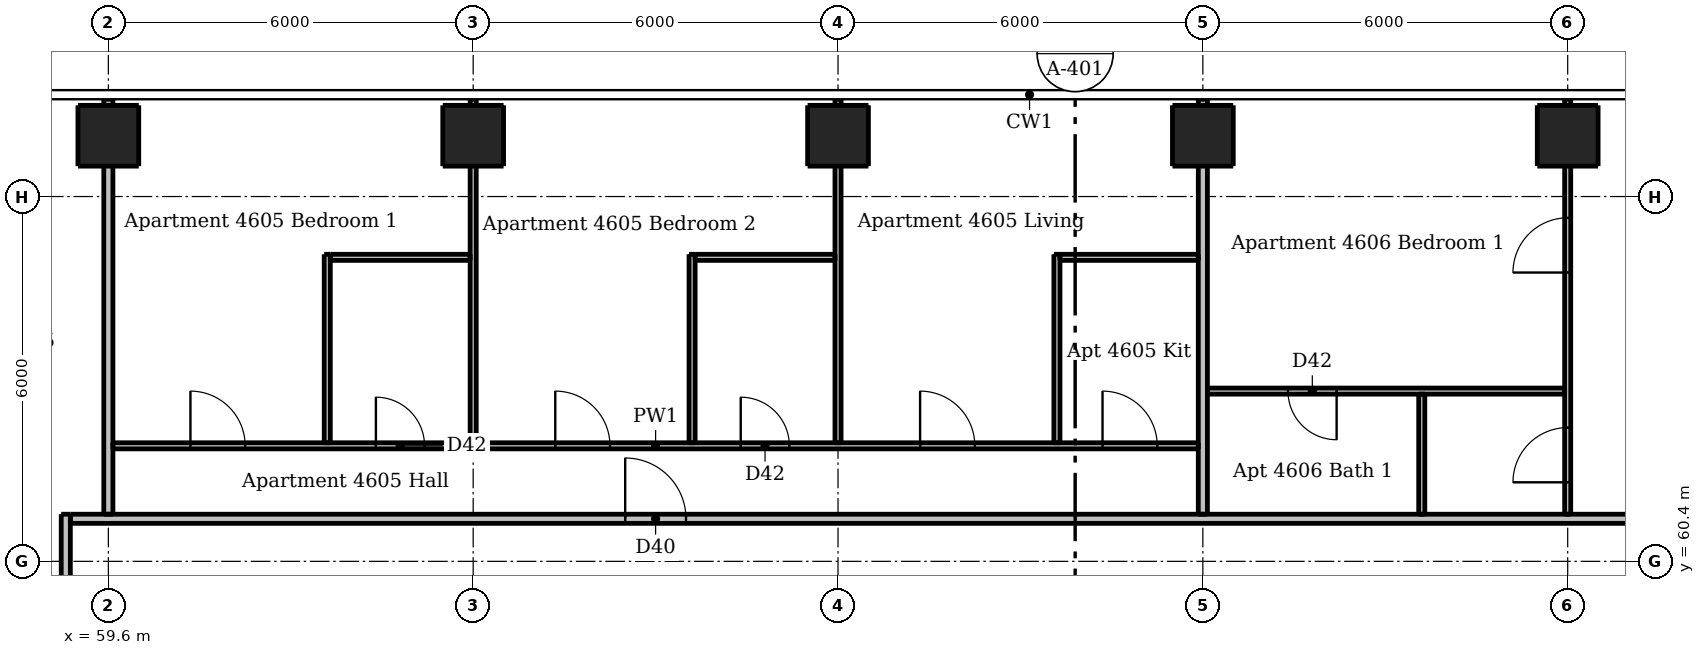
"""IFC4 building model, lengths in metres.
Left out: names, types, materials, properties, quantities, classifications, styles, units other than length and angle.
Written with IfcOpenShell. Run it as: python <this file> out.ifc"""

import sys

from ifc_helpers import new_model, si_unit, direction, frame, frame_2d, origin, origin_2d, place, context, subcontext, project, spatial, rectangle, extrude, element, fill, save


model = new_model("IFC4")
c1 = context("Model", 3, precision=1e-05, world=origin(), true_north=direction((0.0, 1.0)))
c2 = subcontext(c1, "Body", "Model", "MODEL_VIEW")
j1 = project(units=[si_unit("LENGTHUNIT", "METRE"), si_unit("PLANEANGLEUNIT", "RADIAN")], contexts=[c1])
p1 = place(None, origin())
s1 = spatial("IfcSite", under=j1, at=p1, CompositionType="ELEMENT")
p2 = place(p1, origin())
s2 = spatial("IfcBuilding", under=s1, at=p2, CompositionType="ELEMENT")
p3 = place(p2, frame((0.0, 0.0, 171.4)))
s3 = spatial("IfcBuildingStorey", under=s2, at=p3, CompositionType="ELEMENT", Elevation=171.4)
for number, where, z_axis, x_axis in (
    (1, (59.6, 67.4, 0.0), (0.0, 0.0, 1.0), (1.0, 0.0, 0.0)),
    (2, (65.6, 67.4, 0.0), (0.0, 0.0, 1.0), (1.0, 0.0, 0.0)),
    (3, (71.6, 67.4, 0.0), (0.0, 0.0, 1.0), (1.0, 0.0, 0.0)),
    (4, (77.6, 67.4, 0.0), (0.0, 0.0, 1.0), (1.0, 0.0, 0.0)),
    (5, (83.6, 67.4, 0.0), (0.0, 0.0, 1.0), (1.0, 0.0, 0.0)),
):
    element("IfcColumn", number, at=place(p3, frame(where, z_axis=z_axis, x_axis=x_axis)), inside=s3, PredefinedType="COLUMN", context=c2, shape_type="SweptSolid", body=[
        extrude(rectangle(XDim=1.0, YDim=1.0, at=origin_2d()), origin(), (0.0, 0.0, 1.0), 3.05),
    ])
p4 = place(p3, frame((63.2, 62.35, 0.0), z_axis=(0.0, 0.0, 1.0), x_axis=(0.0, 1.0, 0.0)))
e6 = element("IfcWall", 6, at=p4, inside=s3, PredefinedType="PARTITIONING", context=c2, shape_type="SweptSolid", body=[
    extrude(rectangle(XDim=3.1, YDim=0.1, at=frame_2d((1.55, 0.0))), origin(), (0.0, 0.0, 1.0), 3.05),
])
p5 = place(p3, frame((65.6, 62.35, 0.0), z_axis=(0.0, 0.0, 1.0), x_axis=(0.0, 1.0, 0.0)))
e7 = element("IfcWall", 7, at=p5, inside=s3, PredefinedType="PARTITIONING", context=c2, shape_type="SweptSolid", body=[
    extrude(rectangle(XDim=5.65, YDim=0.1, at=frame_2d((2.825, 0.0))), origin(), (0.0, 0.0, 1.0), 2.516),
])
p6 = place(p3, frame((69.2, 62.35, 0.0), z_axis=(0.0, 0.0, 1.0), x_axis=(0.0, 1.0, 0.0)))
e8 = element("IfcWall", 8, at=p6, inside=s3, PredefinedType="PARTITIONING", context=c2, shape_type="SweptSolid", body=[
    extrude(rectangle(XDim=3.1, YDim=0.1, at=frame_2d((1.55, 0.0))), origin(), (0.0, 0.0, 1.0), 3.05),
])
p7 = place(p3, frame((71.6, 62.35, 0.0), z_axis=(0.0, 0.0, 1.0), x_axis=(0.0, 1.0, 0.0)))
e9 = element("IfcWall", 9, at=p7, inside=s3, PredefinedType="PARTITIONING", context=c2, shape_type="SweptSolid", body=[
    extrude(rectangle(XDim=5.65, YDim=0.1, at=frame_2d((2.825, 0.0))), origin(), (0.0, 0.0, 1.0), 2.516),
])
p8 = place(p3, frame((75.2, 62.35, 0.0), z_axis=(0.0, 0.0, 1.0), x_axis=(0.0, 1.0, 0.0)))
e10 = element("IfcWall", 10, at=p8, inside=s3, PredefinedType="PARTITIONING", context=c2, shape_type="SweptSolid", body=[
    extrude(rectangle(XDim=3.1, YDim=0.1, at=frame_2d((1.55, 0.0))), origin(), (0.0, 0.0, 1.0), 3.05),
])
p9 = place(p3, frame((81.2, 61.175, 0.0), z_axis=(0.0, 0.0, 1.0), x_axis=(0.0, 1.0, 0.0)))
e11 = element("IfcWall", 11, at=p9, inside=s3, PredefinedType="PARTITIONING", context=c2, shape_type="SweptSolid", body=[
    extrude(rectangle(XDim=1.975, YDim=0.1, at=frame_2d((0.987, 0.0))), origin(), (0.0, 0.0, 1.0), 3.05),
])
p10 = place(p3, frame((83.6, 61.175, 0.0), z_axis=(0.0, 0.0, 1.0), x_axis=(0.0, 1.0, 0.0)))
e12 = element("IfcWall", 12, at=p10, inside=s3, PredefinedType="PARTITIONING", context=c2, shape_type="SweptSolid", body=[
    extrude(rectangle(XDim=6.825, YDim=0.1, at=frame_2d((3.413, 0.0))), origin(), (0.0, 0.0, 1.0), 2.516),
])
p11 = place(p10, frame((0.525, 0.0, 0.0)))
e13 = element("IfcOpeningElement", 13, at=p11, cuts=e12, PredefinedType="OPENING", context=c2, shape_type="SweptSolid", body=[
    extrude(rectangle(XDim=0.9, YDim=2.1, at=frame_2d((0.45, 1.05))), frame((0.0, 0.06, 0.0), z_axis=(0.0, -1.0, 0.0), x_axis=(1.0, 0.0, 0.0)), (0.0, 0.0, 1.0), 0.12),
])
p12 = place(p10, frame((3.975, 0.0, 0.0)))
e14 = element("IfcOpeningElement", 14, at=p12, cuts=e12, PredefinedType="OPENING", context=c2, shape_type="SweptSolid", body=[
    extrude(rectangle(XDim=0.9, YDim=2.1, at=frame_2d((0.45, 1.05))), frame((0.0, 0.06, 0.0), z_axis=(0.0, -1.0, 0.0), x_axis=(1.0, 0.0, 0.0)), (0.0, 0.0, 1.0), 0.12),
])
for number, where, z_axis, x_axis in (
    (15, (63.25, 65.4, 0.0), (0.0, 0.0, 1.0), (1.0, 0.0, 0.0)),
    (16, (69.25, 65.4, 0.0), (0.0, 0.0, 1.0), (1.0, 0.0, 0.0)),
):
    element("IfcWall", number, at=place(p3, frame(where, z_axis=z_axis, x_axis=x_axis)), inside=s3, PredefinedType="PARTITIONING", context=c2, shape_type="SweptSolid", body=[
        extrude(rectangle(XDim=2.3, YDim=0.1, at=frame_2d((1.15, 0.0))), origin(), (0.0, 0.0, 1.0), 3.05),
    ])
p13 = place(p3, frame((75.25, 65.4, 0.0), z_axis=(0.0, 0.0, 1.0), x_axis=(1.0, 0.0, 0.0)))
e17 = element("IfcWall", 17, at=p13, inside=s3, PredefinedType="PARTITIONING", context=c2, shape_type="SweptSolid", body=[
    extrude(rectangle(XDim=2.275, YDim=0.1, at=frame_2d((1.137, 0.0))), origin(), (0.0, 0.0, 1.0), 3.05),
])
p14 = place(p3, frame((83.55, 63.2, 0.0), z_axis=(0.0, 0.0, 1.0), x_axis=(-1.0, 0.0, 0.0)))
e18 = element("IfcWall", 18, at=p14, inside=s3, PredefinedType="PARTITIONING", context=c2, shape_type="SweptSolid", body=[
    extrude(rectangle(XDim=5.875, YDim=0.1, at=frame_2d((2.938, 0.0))), origin(), (0.0, 0.0, 1.0), 3.05),
])
p15 = place(p14, frame((3.75, 0.0, 0.0)))
e19 = element("IfcOpeningElement", 19, at=p15, cuts=e18, PredefinedType="OPENING", context=c2, shape_type="SweptSolid", body=[
    extrude(rectangle(XDim=0.8, YDim=2.1, at=frame_2d((0.4, 1.05))), frame((0.0, 0.06, 0.0), z_axis=(0.0, -1.0, 0.0), x_axis=(1.0, 0.0, 0.0)), (0.0, 0.0, 1.0), 0.12),
])
p16 = place(p3, frame((59.675, 62.3, 0.0), z_axis=(0.0, 0.0, 1.0), x_axis=(1.0, 0.0, 0.0)))
e20 = element("IfcWall", 20, at=p16, inside=s3, PredefinedType="PARTITIONING", context=c2, shape_type="SweptSolid", body=[
    extrude(rectangle(XDim=17.85, YDim=0.1, at=frame_2d((8.925, 0.0))), origin(), (0.0, 0.0, 1.0), 3.05),
])
p17 = place(p16, frame((13.275, 0.0, 0.0)))
e21 = element("IfcOpeningElement", 21, at=p17, cuts=e20, PredefinedType="OPENING", context=c2, shape_type="SweptSolid", body=[
    extrude(rectangle(XDim=0.9, YDim=2.1, at=frame_2d((0.45, 1.05))), frame((0.0, 0.06, 0.0), z_axis=(0.0, -1.0, 0.0), x_axis=(1.0, 0.0, 0.0)), (0.0, 0.0, 1.0), 0.12),
])
p18 = place(p16, frame((16.275, 0.0, 0.0)))
e22 = element("IfcOpeningElement", 22, at=p18, cuts=e20, PredefinedType="OPENING", context=c2, shape_type="SweptSolid", body=[
    extrude(rectangle(XDim=0.9, YDim=2.1, at=frame_2d((0.45, 1.05))), frame((0.0, 0.06, 0.0), z_axis=(0.0, -1.0, 0.0), x_axis=(1.0, 0.0, 0.0)), (0.0, 0.0, 1.0), 0.12),
])
p19 = place(p16, frame((1.275, 0.0, 0.0)))
e23 = element("IfcOpeningElement", 23, at=p19, cuts=e20, PredefinedType="OPENING", context=c2, shape_type="SweptSolid", body=[
    extrude(rectangle(XDim=0.9, YDim=2.1, at=frame_2d((0.45, 1.05))), frame((0.0, 0.06, 0.0), z_axis=(0.0, -1.0, 0.0), x_axis=(1.0, 0.0, 0.0)), (0.0, 0.0, 1.0), 0.12),
])
p20 = place(p16, frame((7.275, 0.0, 0.0)))
e24 = element("IfcOpeningElement", 24, at=p20, cuts=e20, PredefinedType="OPENING", context=c2, shape_type="SweptSolid", body=[
    extrude(rectangle(XDim=0.9, YDim=2.1, at=frame_2d((0.45, 1.05))), frame((0.0, 0.06, 0.0), z_axis=(0.0, -1.0, 0.0), x_axis=(1.0, 0.0, 0.0)), (0.0, 0.0, 1.0), 0.12),
])
p21 = place(p16, frame((4.325, 0.0, 0.0)))
e25 = element("IfcOpeningElement", 25, at=p21, cuts=e20, PredefinedType="OPENING", context=c2, shape_type="SweptSolid", body=[
    extrude(rectangle(XDim=0.8, YDim=2.1, at=frame_2d((0.4, 1.05))), frame((0.0, 0.06, 0.0), z_axis=(0.0, -1.0, 0.0), x_axis=(1.0, 0.0, 0.0)), (0.0, 0.0, 1.0), 0.12),
])
p22 = place(p16, frame((10.325, 0.0, 0.0)))
e26 = element("IfcOpeningElement", 26, at=p22, cuts=e20, PredefinedType="OPENING", context=c2, shape_type="SweptSolid", body=[
    extrude(rectangle(XDim=0.8, YDim=2.1, at=frame_2d((0.4, 1.05))), frame((0.0, 0.06, 0.0), z_axis=(0.0, -1.0, 0.0), x_axis=(1.0, 0.0, 0.0)), (0.0, 0.0, 1.0), 0.12),
])
p23 = place(p3, frame((58.9, 30.325, 0.0), z_axis=(0.0, 0.0, 1.0), x_axis=(0.0, 1.0, 0.0)))
e27 = element("IfcWall", 27, at=p23, inside=s3, PredefinedType="PARTITIONING", context=c2, shape_type="SweptSolid", body=[
    extrude(rectangle(XDim=30.85, YDim=0.15, at=frame_2d((15.425, 0.0))), origin(), (0.0, 0.0, 1.0), 3.05),
])
p24 = place(p23, frame((9.225, 0.0, 0.0)))
e28 = element("IfcOpeningElement", 28, at=p24, cuts=e27, PredefinedType="OPENING", context=c2, shape_type="SweptSolid", body=[
    extrude(rectangle(XDim=1.0, YDim=2.1, at=frame_2d((0.5, 1.05))), frame((0.0, 0.085, 0.0), z_axis=(0.0, -1.0, 0.0), x_axis=(1.0, 0.0, 0.0)), (0.0, 0.0, 1.0), 0.17),
])
p25 = place(p23, frame((26.925, 0.0, 0.0)))
e29 = element("IfcOpeningElement", 29, at=p25, cuts=e27, PredefinedType="OPENING", context=c2, shape_type="SweptSolid", body=[
    extrude(rectangle(XDim=1.0, YDim=2.1, at=frame_2d((0.5, 1.05))), frame((0.0, 0.085, 0.0), z_axis=(0.0, -1.0, 0.0), x_axis=(1.0, 0.0, 0.0)), (0.0, 0.0, 1.0), 0.17),
])
p26 = place(p3, frame((59.6, 61.175, 0.0), z_axis=(0.0, 0.0, 1.0), x_axis=(0.0, 1.0, 0.0)))
e30 = element("IfcWall", 30, at=p26, inside=s3, PredefinedType="PARTITIONING", context=c2, shape_type="SweptSolid", body=[
    extrude(rectangle(XDim=6.825, YDim=0.15, at=frame_2d((3.413, 0.0))), origin(), (0.0, 0.0, 1.0), 2.51),
])
p27 = place(p3, frame((77.6, 61.175, 0.0), z_axis=(0.0, 0.0, 1.0), x_axis=(0.0, 1.0, 0.0)))
e31 = element("IfcWall", 31, at=p27, inside=s3, PredefinedType="PARTITIONING", context=c2, shape_type="SweptSolid", body=[
    extrude(rectangle(XDim=6.825, YDim=0.15, at=frame_2d((3.413, 0.0))), origin(), (0.0, 0.0, 1.0), 2.516),
])
p28 = place(p3, frame((58.975, 61.1, 0.0), z_axis=(0.0, 0.0, 1.0), x_axis=(1.0, 0.0, 0.0)))
e32 = element("IfcWall", 32, at=p28, inside=s3, PredefinedType="PARTITIONING", context=c2, shape_type="SweptSolid", body=[
    extrude(rectangle(XDim=29.25, YDim=0.15, at=frame_2d((14.625, 0.0))), origin(), (0.0, 0.0, 1.0), 3.05),
])
p29 = place(p28, frame((9.125, 0.0, 0.0)))
e33 = element("IfcOpeningElement", 33, at=p29, cuts=e32, PredefinedType="OPENING", context=c2, shape_type="SweptSolid", body=[
    extrude(rectangle(XDim=1.0, YDim=2.1, at=frame_2d((0.5, 1.05))), frame((0.0, 0.085, 0.0), z_axis=(0.0, -1.0, 0.0), x_axis=(1.0, 0.0, 0.0)), (0.0, 0.0, 1.0), 0.17),
])
p30 = place(p28, frame((26.475, 0.0, 0.0)))
e34 = element("IfcOpeningElement", 34, at=p30, cuts=e32, PredefinedType="OPENING", context=c2, shape_type="SweptSolid", body=[
    extrude(rectangle(XDim=1.0, YDim=2.1, at=frame_2d((0.5, 1.05))), frame((0.0, 0.085, 0.0), z_axis=(0.0, -1.0, 0.0), x_axis=(1.0, 0.0, 0.0)), (0.0, 0.0, 1.0), 0.17),
])
p31 = place(p29, origin())
e35 = element("IfcDoor", 35, at=p31, inside=s3, OperationType="SINGLE_SWING_LEFT", PredefinedType="DOOR", context=c2, shape_type="SweptSolid", body=[
    extrude(rectangle(XDim=1.0, YDim=2.1, at=frame_2d((0.5, 1.05))), frame((0.0, 0.025, 0.0), z_axis=(0.0, -1.0, 0.0), x_axis=(1.0, 0.0, 0.0)), (0.0, 0.0, 1.0), 0.05),
])
fill(e33, e35)
p32 = place(p17, origin())
e36 = element("IfcDoor", 36, at=p32, inside=s3, OperationType="SINGLE_SWING_LEFT", PredefinedType="DOOR", context=c2, shape_type="SweptSolid", body=[
    extrude(rectangle(XDim=0.9, YDim=2.1, at=frame_2d((0.45, 1.05))), frame((0.0, 0.025, 0.0), z_axis=(0.0, -1.0, 0.0), x_axis=(1.0, 0.0, 0.0)), (0.0, 0.0, 1.0), 0.05),
])
fill(e21, e36)
p33 = place(p18, origin())
e37 = element("IfcDoor", 37, at=p33, inside=s3, OperationType="SINGLE_SWING_LEFT", PredefinedType="DOOR", context=c2, shape_type="SweptSolid", body=[
    extrude(rectangle(XDim=0.9, YDim=2.1, at=frame_2d((0.45, 1.05))), frame((0.0, 0.025, 0.0), z_axis=(0.0, -1.0, 0.0), x_axis=(1.0, 0.0, 0.0)), (0.0, 0.0, 1.0), 0.05),
])
fill(e22, e37)
p34 = place(p19, origin())
e38 = element("IfcDoor", 38, at=p34, inside=s3, OperationType="SINGLE_SWING_LEFT", PredefinedType="DOOR", context=c2, shape_type="SweptSolid", body=[
    extrude(rectangle(XDim=0.9, YDim=2.1, at=frame_2d((0.45, 1.05))), frame((0.0, 0.025, 0.0), z_axis=(0.0, -1.0, 0.0), x_axis=(1.0, 0.0, 0.0)), (0.0, 0.0, 1.0), 0.05),
])
fill(e23, e38)
p35 = place(p20, origin())
e39 = element("IfcDoor", 39, at=p35, inside=s3, OperationType="SINGLE_SWING_LEFT", PredefinedType="DOOR", context=c2, shape_type="SweptSolid", body=[
    extrude(rectangle(XDim=0.9, YDim=2.1, at=frame_2d((0.45, 1.05))), frame((0.0, 0.025, 0.0), z_axis=(0.0, -1.0, 0.0), x_axis=(1.0, 0.0, 0.0)), (0.0, 0.0, 1.0), 0.05),
])
fill(e24, e39)
p36 = place(p21, origin())
e40 = element("IfcDoor", 40, at=p36, inside=s3, OperationType="SINGLE_SWING_LEFT", PredefinedType="DOOR", context=c2, shape_type="SweptSolid", body=[
    extrude(rectangle(XDim=0.8, YDim=2.1, at=frame_2d((0.4, 1.05))), frame((0.0, 0.025, 0.0), z_axis=(0.0, -1.0, 0.0), x_axis=(1.0, 0.0, 0.0)), (0.0, 0.0, 1.0), 0.05),
])
fill(e25, e40)
p37 = place(p22, origin())
e41 = element("IfcDoor", 41, at=p37, inside=s3, OperationType="SINGLE_SWING_LEFT", PredefinedType="DOOR", context=c2, shape_type="SweptSolid", body=[
    extrude(rectangle(XDim=0.8, YDim=2.1, at=frame_2d((0.4, 1.05))), frame((0.0, 0.025, 0.0), z_axis=(0.0, -1.0, 0.0), x_axis=(1.0, 0.0, 0.0)), (0.0, 0.0, 1.0), 0.05),
])
fill(e26, e41)
p38 = place(p11, origin())
e42 = element("IfcDoor", 42, at=p38, inside=s3, OperationType="SINGLE_SWING_LEFT", PredefinedType="DOOR", context=c2, shape_type="SweptSolid", body=[
    extrude(rectangle(XDim=0.9, YDim=2.1, at=frame_2d((0.45, 1.05))), frame((0.0, 0.025, 0.0), z_axis=(0.0, -1.0, 0.0), x_axis=(1.0, 0.0, 0.0)), (0.0, 0.0, 1.0), 0.05),
])
fill(e13, e42)
p39 = place(p12, origin())
e43 = element("IfcDoor", 43, at=p39, inside=s3, OperationType="SINGLE_SWING_LEFT", PredefinedType="DOOR", context=c2, shape_type="SweptSolid", body=[
    extrude(rectangle(XDim=0.9, YDim=2.1, at=frame_2d((0.45, 1.05))), frame((0.0, 0.025, 0.0), z_axis=(0.0, -1.0, 0.0), x_axis=(1.0, 0.0, 0.0)), (0.0, 0.0, 1.0), 0.05),
])
fill(e14, e43)
p40 = place(p15, origin())
e44 = element("IfcDoor", 44, at=p40, inside=s3, OperationType="SINGLE_SWING_LEFT", PredefinedType="DOOR", context=c2, shape_type="SweptSolid", body=[
    extrude(rectangle(XDim=0.8, YDim=2.1, at=frame_2d((0.4, 1.05))), frame((0.0, 0.025, 0.0), z_axis=(0.0, -1.0, 0.0), x_axis=(1.0, 0.0, 0.0)), (0.0, 0.0, 1.0), 0.05),
])
fill(e19, e44)
save(model, sys.argv[1])
